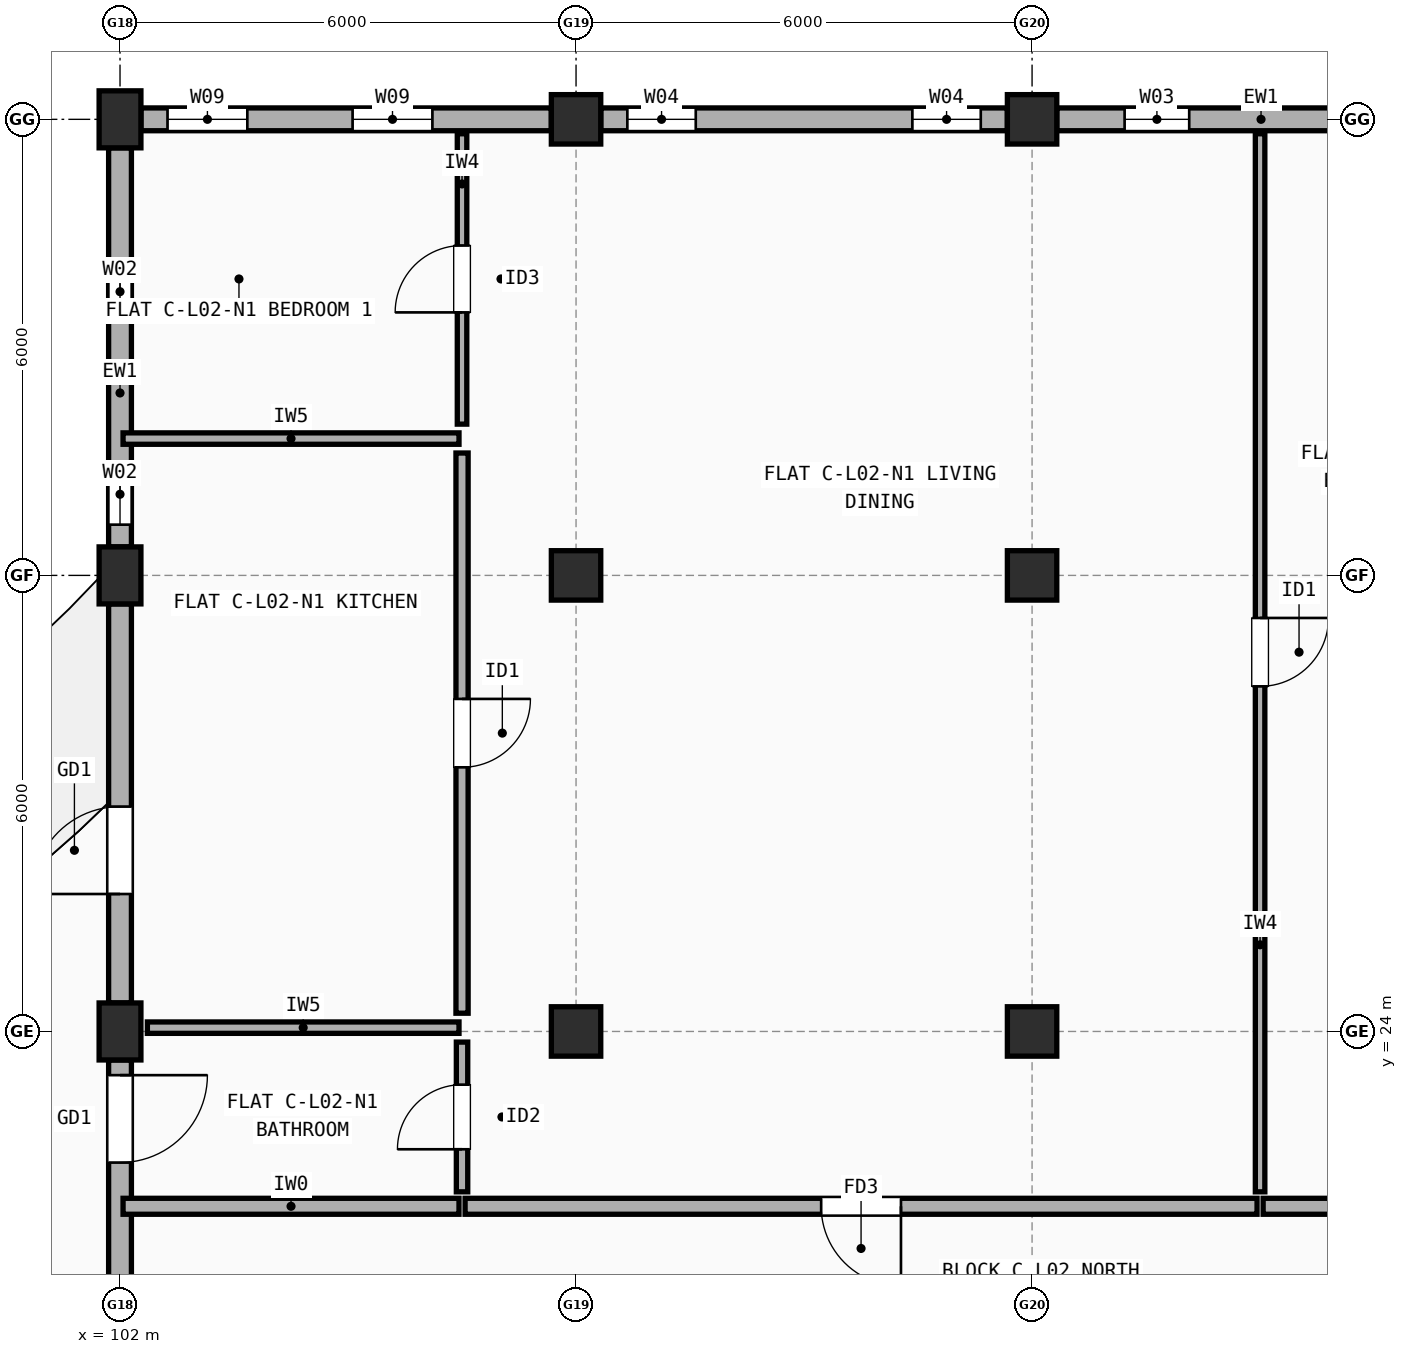
"""IFC4 building model, lengths in metres.
Left out: names, types, materials, properties, quantities, classifications, styles, units other than length and angle.
Written with IfcOpenShell. Run it as: python <this file> out.ifc"""

import sys

from ifc_helpers import new_model, si_unit, direction, frame, frame_2d, origin, origin_2d, place, context, subcontext, project, spatial, rectangle, extrude, element, fill, save


model = new_model("IFC4")
c1 = context("Model", 3, precision=1e-05, world=origin(), true_north=direction((0.0, 1.0)))
c2 = subcontext(c1, "Body", "Model", "MODEL_VIEW")
j1 = project(units=[si_unit("LENGTHUNIT", "METRE"), si_unit("PLANEANGLEUNIT", "RADIAN")], contexts=[c1])
p1 = place(None, origin())
s1 = spatial("IfcSite", under=j1, at=p1, CompositionType="ELEMENT")
p2 = place(p1, origin())
s2 = spatial("IfcBuilding", under=s1, at=p2, CompositionType="ELEMENT")
p3 = place(p2, frame((0.0, 0.0, 7.7)))
s3 = spatial("IfcBuildingStorey", under=s2, at=p3, CompositionType="ELEMENT", Elevation=7.7)
for number, where, z_axis, x_axis in (
    (1, (102.0, 24.0, 0.0), (0.0, 0.0, 1.0), (1.0, 0.0, 0.0)),
    (2, (102.0, 30.0, 0.0), (0.0, 0.0, 1.0), (1.0, 0.0, 0.0)),
    (3, (102.0, 36.0, 0.0), (0.0, 0.0, 1.0), (1.0, 0.0, 0.0)),
):
    element("IfcColumn", number, at=place(p3, frame(where, z_axis=z_axis, x_axis=x_axis)), inside=s3, PredefinedType="COLUMN", context=c2, shape_type="SweptSolid", body=[
        extrude(rectangle(XDim=0.55, YDim=0.75, at=origin_2d()), origin(), (0.0, 0.0, 1.0), 2.955),
    ])
for number, where, z_axis, x_axis in (
    (4, (108.0, 24.0, 0.0), (0.0, 0.0, 1.0), (1.0, 0.0, 0.0)),
    (5, (108.0, 30.0, 0.0), (0.0, 0.0, 1.0), (1.0, 0.0, 0.0)),
    (6, (108.0, 36.0, 0.0), (0.0, 0.0, 1.0), (1.0, 0.0, 0.0)),
    (7, (114.0, 24.0, 0.0), (0.0, 0.0, 1.0), (1.0, 0.0, 0.0)),
    (8, (114.0, 30.0, 0.0), (0.0, 0.0, 1.0), (1.0, 0.0, 0.0)),
    (9, (114.0, 36.0, 0.0), (0.0, 0.0, 1.0), (1.0, 0.0, 0.0)),
):
    element("IfcColumn", number, at=place(p3, frame(where, z_axis=z_axis, x_axis=x_axis)), inside=s3, PredefinedType="COLUMN", context=c2, shape_type="SweptSolid", body=[
        extrude(rectangle(XDim=0.65, YDim=0.65, at=origin_2d()), origin(), (0.0, 0.0, 1.0), 2.955),
    ])
p4 = place(p3, frame((119.675, 36.0, 0.0), z_axis=(0.0, 0.0, 1.0), x_axis=(-1.0, 0.0, 0.0)))
e10 = element("IfcWall", 10, at=p4, inside=s3, PredefinedType="STANDARD", context=c2, shape_type="SweptSolid", body=[
    extrude(rectangle(XDim=5.35, YDim=0.3, at=frame_2d((2.675, 0.0))), origin(), (0.0, 0.0, 1.0), 2.437),
])
p5 = place(p4, frame((0.917, 0.0, 0.9)))
e11 = element("IfcOpeningElement", 11, at=p5, cuts=e10, PredefinedType="OPENING", context=c2, shape_type="SweptSolid", body=[
    extrude(rectangle(XDim=0.8, YDim=1.2, at=frame_2d((0.4, 0.6))), frame((0.0, 0.16, 0.0), z_axis=(0.0, -1.0, 0.0), x_axis=(1.0, 0.0, 0.0)), (0.0, 0.0, 1.0), 0.32),
])
p6 = place(p4, frame((3.607, 0.0, 0.9)))
e12 = element("IfcOpeningElement", 12, at=p6, cuts=e10, PredefinedType="OPENING", context=c2, shape_type="SweptSolid", body=[
    extrude(rectangle(XDim=0.85, YDim=1.25, at=frame_2d((0.425, 0.625))), frame((0.0, 0.16, 0.0), z_axis=(0.0, -1.0, 0.0), x_axis=(1.0, 0.0, 0.0)), (0.0, 0.0, 1.0), 0.32),
])
p7 = place(p3, frame((113.675, 36.0, 0.0), z_axis=(0.0, 0.0, 1.0), x_axis=(-1.0, 0.0, 0.0)))
e13 = element("IfcWall", 13, at=p7, inside=s3, PredefinedType="STANDARD", context=c2, shape_type="SweptSolid", body=[
    extrude(rectangle(XDim=5.35, YDim=0.3, at=frame_2d((2.675, 0.0))), origin(), (0.0, 0.0, 1.0), 2.437),
])
p8 = place(p7, frame((0.35, 0.0, 0.9)))
e14 = element("IfcOpeningElement", 14, at=p8, cuts=e13, PredefinedType="OPENING", context=c2, shape_type="SweptSolid", body=[
    extrude(rectangle(XDim=0.9, YDim=1.3, at=frame_2d((0.45, 0.65))), frame((0.0, 0.16, 0.0), z_axis=(0.0, -1.0, 0.0), x_axis=(1.0, 0.0, 0.0)), (0.0, 0.0, 1.0), 0.32),
])
p9 = place(p7, frame((4.1, 0.0, 0.9)))
e15 = element("IfcOpeningElement", 15, at=p9, cuts=e13, PredefinedType="OPENING", context=c2, shape_type="SweptSolid", body=[
    extrude(rectangle(XDim=0.9, YDim=1.3, at=frame_2d((0.45, 0.65))), frame((0.0, 0.16, 0.0), z_axis=(0.0, -1.0, 0.0), x_axis=(1.0, 0.0, 0.0)), (0.0, 0.0, 1.0), 0.32),
])
p10 = place(p3, frame((107.675, 36.0, 0.0), z_axis=(0.0, 0.0, 1.0), x_axis=(-1.0, 0.0, 0.0)))
e16 = element("IfcWall", 16, at=p10, inside=s3, PredefinedType="STANDARD", context=c2, shape_type="SweptSolid", body=[
    extrude(rectangle(XDim=5.4, YDim=0.3, at=frame_2d((2.7, 0.0))), origin(), (0.0, 0.0, 1.0), 2.437),
])
p11 = place(p10, frame((1.565, 0.0, 0.9)))
e17 = element("IfcOpeningElement", 17, at=p11, cuts=e16, PredefinedType="OPENING", context=c2, shape_type="SweptSolid", body=[
    extrude(rectangle(XDim=1.05, YDim=1.35, at=frame_2d((0.525, 0.675))), frame((0.0, 0.16, 0.0), z_axis=(0.0, -1.0, 0.0), x_axis=(1.0, 0.0, 0.0)), (0.0, 0.0, 1.0), 0.32),
])
p12 = place(p10, frame((4.0, 0.0, 0.9)))
e18 = element("IfcOpeningElement", 18, at=p12, cuts=e16, PredefinedType="OPENING", context=c2, shape_type="SweptSolid", body=[
    extrude(rectangle(XDim=1.05, YDim=1.35, at=frame_2d((0.525, 0.675))), frame((0.0, 0.16, 0.0), z_axis=(0.0, -1.0, 0.0), x_axis=(1.0, 0.0, 0.0)), (0.0, 0.0, 1.0), 0.32),
])
p13 = place(p3, frame((102.0, 35.625, 0.0), z_axis=(0.0, 0.0, 1.0), x_axis=(0.0, -1.0, 0.0)))
e19 = element("IfcWall", 19, at=p13, inside=s3, PredefinedType="STANDARD", context=c2, shape_type="SweptSolid", body=[
    extrude(rectangle(XDim=5.25, YDim=0.3, at=frame_2d((2.625, 0.0))), origin(), (0.0, 0.0, 1.0), 2.437),
])
p14 = place(p13, frame((1.492, 0.0, 0.9)))
e20 = element("IfcOpeningElement", 20, at=p14, cuts=e19, PredefinedType="OPENING", context=c2, shape_type="SweptSolid", body=[
    extrude(rectangle(XDim=0.8, YDim=1.2, at=frame_2d((0.4, 0.6))), frame((0.0, 0.16, 0.0), z_axis=(0.0, -1.0, 0.0), x_axis=(1.0, 0.0, 0.0)), (0.0, 0.0, 1.0), 0.32),
])
p15 = place(p13, frame((4.157, 0.0, 0.9)))
e21 = element("IfcOpeningElement", 21, at=p15, cuts=e19, PredefinedType="OPENING", context=c2, shape_type="SweptSolid", body=[
    extrude(rectangle(XDim=0.8, YDim=1.2, at=frame_2d((0.4, 0.6))), frame((0.0, 0.16, 0.0), z_axis=(0.0, -1.0, 0.0), x_axis=(1.0, 0.0, 0.0)), (0.0, 0.0, 1.0), 0.32),
])
p16 = place(p3, frame((102.0, 29.625, 0.0), z_axis=(0.0, 0.0, 1.0), x_axis=(0.0, -1.0, 0.0)))
e22 = element("IfcWall", 22, at=p16, inside=s3, PredefinedType="STANDARD", context=c2, shape_type="SweptSolid", body=[
    extrude(rectangle(XDim=5.25, YDim=0.3, at=frame_2d((2.625, 0.0))), origin(), (0.0, 0.0, 1.0), 2.437),
])
p17 = place(p16, frame((2.667, 0.0, 0.0)))
e23 = element("IfcOpeningElement", 23, at=p17, cuts=e22, PredefinedType="OPENING", context=c2, shape_type="SweptSolid", body=[
    extrude(rectangle(XDim=1.15, YDim=2.15, at=frame_2d((0.575, 1.075))), frame((0.0, 0.16, 0.0), z_axis=(0.0, -1.0, 0.0), x_axis=(1.0, 0.0, 0.0)), (0.0, 0.0, 1.0), 0.32),
])
p18 = place(p3, frame((102.0, 23.625, 0.0), z_axis=(0.0, 0.0, 1.0), x_axis=(0.0, -1.0, 0.0)))
e24 = element("IfcWall", 24, at=p18, inside=s3, PredefinedType="STANDARD", context=c2, shape_type="SweptSolid", body=[
    extrude(rectangle(XDim=5.25, YDim=0.3, at=frame_2d((2.625, 0.0))), origin(), (0.0, 0.0, 1.0), 2.437),
])
p19 = place(p18, frame((0.2, 0.0, 0.0)))
e25 = element("IfcOpeningElement", 25, at=p19, cuts=e24, PredefinedType="OPENING", context=c2, shape_type="SweptSolid", body=[
    extrude(rectangle(XDim=1.15, YDim=2.15, at=frame_2d((0.575, 1.075))), frame((0.0, 0.16, 0.0), z_axis=(0.0, -1.0, 0.0), x_axis=(1.0, 0.0, 0.0)), (0.0, 0.0, 1.0), 0.32),
])
p20 = place(p18, frame((3.157, 0.0, 0.9)))
e26 = element("IfcOpeningElement", 26, at=p20, cuts=e24, PredefinedType="OPENING", context=c2, shape_type="SweptSolid", body=[
    extrude(rectangle(XDim=0.9, YDim=1.3, at=frame_2d((0.45, 0.65))), frame((0.0, 0.16, 0.0), z_axis=(0.0, -1.0, 0.0), x_axis=(1.0, 0.0, 0.0)), (0.0, 0.0, 1.0), 0.32),
])
p21 = place(p3, frame((102.04, 21.7, 0.0), z_axis=(0.0, 0.0, 1.0), x_axis=(1.0, 0.0, 0.0)))
e27 = element("IfcWall", 27, at=p21, inside=s3, PredefinedType="SOLIDWALL", context=c2, shape_type="SweptSolid", body=[
    extrude(rectangle(XDim=4.42, YDim=0.21, at=frame_2d((2.21, 0.0))), origin(), (0.0, 0.0, 1.0), 2.437),
])
p22 = place(p3, frame((106.54, 21.7, 0.0), z_axis=(0.0, 0.0, 1.0), x_axis=(1.0, 0.0, 0.0)))
e28 = element("IfcWall", 28, at=p22, inside=s3, PredefinedType="SOLIDWALL", context=c2, shape_type="SweptSolid", body=[
    extrude(rectangle(XDim=10.42, YDim=0.21, at=frame_2d((5.21, 0.0))), origin(), (0.0, 0.0, 1.0), 2.508),
])
p23 = place(p22, frame((4.685, 0.0, 0.0)))
e29 = element("IfcOpeningElement", 29, at=p23, cuts=e28, PredefinedType="OPENING", context=c2, shape_type="SweptSolid", body=[
    extrude(rectangle(XDim=1.05, YDim=2.15, at=frame_2d((0.525, 1.075))), frame((0.0, 0.115, 0.0), z_axis=(0.0, -1.0, 0.0), x_axis=(1.0, 0.0, 0.0)), (0.0, 0.0, 1.0), 0.23),
])
p24 = place(p3, frame((106.5, 31.99, 0.0), z_axis=(0.0, 0.0, 1.0), x_axis=(0.0, 1.0, 0.0)))
e30 = element("IfcWall", 30, at=p24, inside=s3, PredefinedType="PARTITIONING", context=c2, shape_type="SweptSolid", body=[
    extrude(rectangle(XDim=3.82, YDim=0.125, at=frame_2d((1.91, 0.0))), origin(), (0.0, 0.0, 1.0), 2.955),
])
p25 = place(p24, frame((1.47, 0.0, 0.0)))
e31 = element("IfcOpeningElement", 31, at=p25, cuts=e30, PredefinedType="OPENING", context=c2, shape_type="SweptSolid", body=[
    extrude(rectangle(XDim=0.88, YDim=2.1, at=frame_2d((0.44, 1.05))), frame((0.0, 0.073, 0.0), z_axis=(0.0, -1.0, 0.0), x_axis=(1.0, 0.0, 0.0)), (0.0, 0.0, 1.0), 0.145),
])
p26 = place(p3, frame((106.5, 24.24, 0.0), z_axis=(0.0, 0.0, 1.0), x_axis=(0.0, 1.0, 0.0)))
e32 = element("IfcWall", 32, at=p26, inside=s3, PredefinedType="PLUMBINGWALL", context=c2, shape_type="SweptSolid", body=[
    extrude(rectangle(XDim=7.37, YDim=0.16, at=frame_2d((3.685, 0.0))), origin(), (0.0, 0.0, 1.0), 2.437),
])
p27 = place(p26, frame((3.235, 0.0, 0.0)))
e33 = element("IfcOpeningElement", 33, at=p27, cuts=e32, PredefinedType="OPENING", context=c2, shape_type="SweptSolid", body=[
    extrude(rectangle(XDim=0.9, YDim=2.1, at=frame_2d((0.45, 1.05))), frame((0.0, 0.09, 0.0), z_axis=(0.0, -1.0, 0.0), x_axis=(1.0, 0.0, 0.0)), (0.0, 0.0, 1.0), 0.18),
])
p28 = place(p3, frame((106.5, 21.89, 0.0), z_axis=(0.0, 0.0, 1.0), x_axis=(0.0, 1.0, 0.0)))
e34 = element("IfcWall", 34, at=p28, inside=s3, PredefinedType="PARTITIONING", context=c2, shape_type="SweptSolid", body=[
    extrude(rectangle(XDim=1.97, YDim=0.15, at=frame_2d((0.985, 0.0))), origin(), (0.0, 0.0, 1.0), 2.955),
])
p29 = place(p28, frame((0.56, 0.0, 0.0)))
e35 = element("IfcOpeningElement", 35, at=p29, cuts=e34, PredefinedType="OPENING", context=c2, shape_type="SweptSolid", body=[
    extrude(rectangle(XDim=0.85, YDim=2.1, at=frame_2d((0.425, 1.05))), frame((0.0, 0.085, 0.0), z_axis=(0.0, -1.0, 0.0), x_axis=(1.0, 0.0, 0.0)), (0.0, 0.0, 1.0), 0.17),
])
p30 = place(p3, frame((102.04, 31.8, 0.0), z_axis=(0.0, 0.0, 1.0), x_axis=(1.0, 0.0, 0.0)))
e36 = element("IfcWall", 36, at=p30, inside=s3, PredefinedType="PARTITIONING", context=c2, shape_type="SweptSolid", body=[
    extrude(rectangle(XDim=4.42, YDim=0.15, at=frame_2d((2.21, 0.0))), origin(), (0.0, 0.0, 1.0), 2.437),
])
p31 = place(p3, frame((102.36, 24.05, 0.0), z_axis=(0.0, 0.0, 1.0), x_axis=(1.0, 0.0, 0.0)))
e37 = element("IfcWall", 37, at=p31, inside=s3, PredefinedType="PARTITIONING", context=c2, shape_type="SweptSolid", body=[
    extrude(rectangle(XDim=4.1, YDim=0.15, at=frame_2d((2.05, 0.0))), origin(), (0.0, 0.0, 1.0), 2.387),
])
p32 = place(p3, frame((117.04, 21.7, 0.0), z_axis=(0.0, 0.0, 1.0), x_axis=(1.0, 0.0, 0.0)))
e38 = element("IfcWall", 38, at=p32, inside=s3, PredefinedType="SOLIDWALL", context=c2, shape_type="SweptSolid", body=[
    extrude(rectangle(XDim=2.92, YDim=0.21, at=frame_2d((1.46, 0.0))), origin(), (0.0, 0.0, 1.0), 2.955),
])
p33 = place(p3, frame((117.0, 21.89, 0.0), z_axis=(0.0, 0.0, 1.0), x_axis=(0.0, 1.0, 0.0)))
e39 = element("IfcWall", 39, at=p33, inside=s3, PredefinedType="PARTITIONING", context=c2, shape_type="SweptSolid", body=[
    extrude(rectangle(XDim=13.92, YDim=0.125, at=frame_2d((6.96, 0.0))), origin(), (0.0, 0.0, 1.0), 2.387),
])
p34 = place(p33, frame((6.65, 0.0, 0.0)))
e40 = element("IfcOpeningElement", 40, at=p34, cuts=e39, PredefinedType="OPENING", context=c2, shape_type="SweptSolid", body=[
    extrude(rectangle(XDim=0.9, YDim=2.1, at=frame_2d((0.45, 1.05))), frame((0.0, 0.073, 0.0), z_axis=(0.0, -1.0, 0.0), x_axis=(1.0, 0.0, 0.0)), (0.0, 0.0, 1.0), 0.145),
])
p35 = place(p6, origin())
e41 = element("IfcWindow", 41, at=p35, inside=s3, PartitioningType="SINGLE_PANEL", PredefinedType="WINDOW", context=c2, shape_type="SweptSolid", body=[
    extrude(rectangle(XDim=0.85, YDim=1.25, at=frame_2d((0.425, 0.625))), frame((0.0, 0.03, 0.0), z_axis=(0.0, -1.0, 0.0), x_axis=(1.0, 0.0, 0.0)), (0.0, 0.0, 1.0), 0.06),
])
fill(e12, e41)
p36 = place(p8, origin())
e42 = element("IfcWindow", 42, at=p36, inside=s3, PartitioningType="SINGLE_PANEL", PredefinedType="WINDOW", context=c2, shape_type="SweptSolid", body=[
    extrude(rectangle(XDim=0.9, YDim=1.3, at=frame_2d((0.45, 0.65))), frame((0.0, 0.03, 0.0), z_axis=(0.0, -1.0, 0.0), x_axis=(1.0, 0.0, 0.0)), (0.0, 0.0, 1.0), 0.06),
])
fill(e14, e42)
p37 = place(p9, origin())
e43 = element("IfcWindow", 43, at=p37, inside=s3, PartitioningType="SINGLE_PANEL", PredefinedType="WINDOW", context=c2, shape_type="SweptSolid", body=[
    extrude(rectangle(XDim=0.9, YDim=1.3, at=frame_2d((0.45, 0.65))), frame((0.0, 0.03, 0.0), z_axis=(0.0, -1.0, 0.0), x_axis=(1.0, 0.0, 0.0)), (0.0, 0.0, 1.0), 0.06),
])
fill(e15, e43)
p38 = place(p11, origin())
e44 = element("IfcWindow", 44, at=p38, inside=s3, PartitioningType="SINGLE_PANEL", PredefinedType="WINDOW", context=c2, shape_type="SweptSolid", body=[
    extrude(rectangle(XDim=1.05, YDim=1.35, at=frame_2d((0.525, 0.675))), frame((0.0, 0.03, 0.0), z_axis=(0.0, -1.0, 0.0), x_axis=(1.0, 0.0, 0.0)), (0.0, 0.0, 1.0), 0.06),
])
fill(e17, e44)
p39 = place(p12, origin())
e45 = element("IfcWindow", 45, at=p39, inside=s3, PartitioningType="SINGLE_PANEL", PredefinedType="WINDOW", context=c2, shape_type="SweptSolid", body=[
    extrude(rectangle(XDim=1.05, YDim=1.35, at=frame_2d((0.525, 0.675))), frame((0.0, 0.03, 0.0), z_axis=(0.0, -1.0, 0.0), x_axis=(1.0, 0.0, 0.0)), (0.0, 0.0, 1.0), 0.06),
])
fill(e18, e45)
p40 = place(p14, origin())
e46 = element("IfcWindow", 46, at=p40, inside=s3, PartitioningType="SINGLE_PANEL", PredefinedType="WINDOW", context=c2, shape_type="SweptSolid", body=[
    extrude(rectangle(XDim=0.8, YDim=1.2, at=frame_2d((0.4, 0.6))), frame((0.0, 0.03, 0.0), z_axis=(0.0, -1.0, 0.0), x_axis=(1.0, 0.0, 0.0)), (0.0, 0.0, 1.0), 0.06),
])
fill(e20, e46)
p41 = place(p15, origin())
e47 = element("IfcWindow", 47, at=p41, inside=s3, PartitioningType="SINGLE_PANEL", PredefinedType="WINDOW", context=c2, shape_type="SweptSolid", body=[
    extrude(rectangle(XDim=0.8, YDim=1.2, at=frame_2d((0.4, 0.6))), frame((0.0, 0.03, 0.0), z_axis=(0.0, -1.0, 0.0), x_axis=(1.0, 0.0, 0.0)), (0.0, 0.0, 1.0), 0.06),
])
fill(e21, e47)
p42 = place(p17, frame((1.15, 0.0, 0.0), z_axis=(0.0, 0.0, 1.0), x_axis=(-1.0, 0.0, 0.0)))
e48 = element("IfcDoor", 48, at=p42, inside=s3, OperationType="SINGLE_SWING_RIGHT", PredefinedType="DOOR", context=c2, shape_type="SweptSolid", body=[
    extrude(rectangle(XDim=1.15, YDim=2.15, at=frame_2d((0.575, 1.075))), frame((0.0, 0.025, 0.0), z_axis=(0.0, -1.0, 0.0), x_axis=(1.0, 0.0, 0.0)), (0.0, 0.0, 1.0), 0.05),
])
fill(e23, e48)
p43 = place(p19, frame((1.15, 0.0, 0.0), z_axis=(0.0, 0.0, 1.0), x_axis=(-1.0, 0.0, 0.0)))
e49 = element("IfcDoor", 49, at=p43, inside=s3, OperationType="SINGLE_SWING_LEFT", PredefinedType="DOOR", context=c2, shape_type="SweptSolid", body=[
    extrude(rectangle(XDim=1.15, YDim=2.15, at=frame_2d((0.575, 1.075))), frame((0.0, 0.025, 0.0), z_axis=(0.0, -1.0, 0.0), x_axis=(1.0, 0.0, 0.0)), (0.0, 0.0, 1.0), 0.05),
])
fill(e25, e49)
p44 = place(p23, origin())
e50 = element("IfcDoor", 50, at=p44, inside=s3, OperationType="SINGLE_SWING_RIGHT", PredefinedType="DOOR", context=c2, shape_type="SweptSolid", body=[
    extrude(rectangle(XDim=1.05, YDim=2.15, at=frame_2d((0.525, 1.075))), frame((0.0, 0.025, 0.0), z_axis=(0.0, -1.0, 0.0), x_axis=(1.0, 0.0, 0.0)), (0.0, 0.0, 1.0), 0.05),
])
fill(e29, e50)
p45 = place(p25, origin())
e51 = element("IfcDoor", 51, at=p45, inside=s3, OperationType="SINGLE_SWING_LEFT", PredefinedType="DOOR", context=c2, shape_type="SweptSolid", body=[
    extrude(rectangle(XDim=0.88, YDim=2.1, at=frame_2d((0.44, 1.05))), frame((0.0, 0.025, 0.0), z_axis=(0.0, -1.0, 0.0), x_axis=(1.0, 0.0, 0.0)), (0.0, 0.0, 1.0), 0.05),
])
fill(e31, e51)
p46 = place(p27, origin())
e52 = element("IfcDoor", 52, at=p46, inside=s3, OperationType="SINGLE_SWING_RIGHT", PredefinedType="DOOR", context=c2, shape_type="SweptSolid", body=[
    extrude(rectangle(XDim=0.9, YDim=2.1, at=frame_2d((0.45, 1.05))), frame((0.0, 0.025, 0.0), z_axis=(0.0, -1.0, 0.0), x_axis=(1.0, 0.0, 0.0)), (0.0, 0.0, 1.0), 0.05),
])
fill(e33, e52)
p47 = place(p29, origin())
e53 = element("IfcDoor", 53, at=p47, inside=s3, OperationType="SINGLE_SWING_LEFT", PredefinedType="DOOR", context=c2, shape_type="SweptSolid", body=[
    extrude(rectangle(XDim=0.85, YDim=2.1, at=frame_2d((0.425, 1.05))), frame((0.0, 0.025, 0.0), z_axis=(0.0, -1.0, 0.0), x_axis=(1.0, 0.0, 0.0)), (0.0, 0.0, 1.0), 0.05),
])
fill(e35, e53)
p48 = place(p34, origin())
e54 = element("IfcDoor", 54, at=p48, inside=s3, OperationType="SINGLE_SWING_RIGHT", PredefinedType="DOOR", context=c2, shape_type="SweptSolid", body=[
    extrude(rectangle(XDim=0.9, YDim=2.1, at=frame_2d((0.45, 1.05))), frame((0.0, 0.025, 0.0), z_axis=(0.0, -1.0, 0.0), x_axis=(1.0, 0.0, 0.0)), (0.0, 0.0, 1.0), 0.05),
])
fill(e40, e54)
save(model, sys.argv[1])
